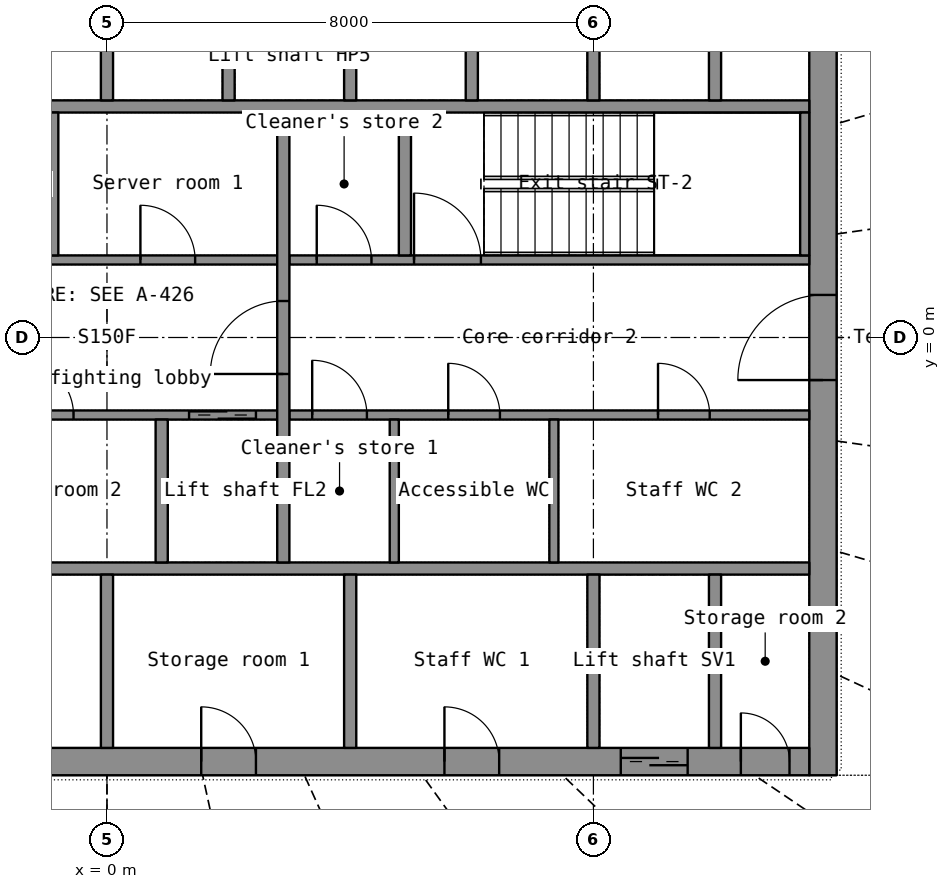
"""IFC4 building model, lengths in metres.
Left out: names, types, materials, properties, quantities, classifications, styles, units other than length and angle.
Written with IfcOpenShell. Run it as: python <this file> out.ifc"""

import sys

from ifc_helpers import new_model, si_unit, direction, frame, frame_2d, origin, place, context, subcontext, project, spatial, rectangle, extrude, element, fill, save


model = new_model("IFC4")
c1 = context("Model", 3, precision=1e-05, world=origin(), true_north=direction((0.0, 1.0)))
c2 = subcontext(c1, "Body", "Model", "MODEL_VIEW")
j1 = project(units=[si_unit("LENGTHUNIT", "METRE"), si_unit("PLANEANGLEUNIT", "RADIAN")], contexts=[c1])
p1 = place(None, origin())
s1 = spatial("IfcSite", under=j1, at=p1, CompositionType="ELEMENT")
p2 = place(p1, origin())
s2 = spatial("IfcBuilding", under=s1, at=p2, CompositionType="ELEMENT")
p3 = place(p2, frame((0.0, 0.0, 201.5)))
s3 = spatial("IfcBuildingStorey", under=s2, at=p3, CompositionType="ELEMENT", Elevation=201.5)
p4 = place(p3, frame((11.775, -7.2, 0.0), z_axis=(0.0, 0.0, 1.0), x_axis=(0.0, 1.0, 0.0)))
e1 = element("IfcWall", 1, at=p4, inside=s3, PredefinedType="SHEAR", context=c2, shape_type="SweptSolid", body=[
    extrude(rectangle(XDim=14.4, YDim=0.45, at=frame_2d((7.2, 0.0))), origin(), (0.0, 0.0, 1.0), 3.3),
])
p5 = place(p4, frame((6.5, 0.0, 0.0)))
e2 = element("IfcOpeningElement", 2, at=p5, cuts=e1, PredefinedType="OPENING", context=c2, shape_type="SweptSolid", body=[
    extrude(rectangle(XDim=1.4, YDim=2.2, at=frame_2d((0.7, 1.1))), frame((0.0, 0.235, 0.0), z_axis=(0.0, -1.0, 0.0), x_axis=(1.0, 0.0, 0.0)), (0.0, 0.0, 1.0), 0.47),
])
p6 = place(p3, frame((-11.55, -6.975, 0.0), z_axis=(0.0, 0.0, 1.0), x_axis=(1.0, 0.0, 0.0)))
e3 = element("IfcWall", 3, at=p6, inside=s3, PredefinedType="SHEAR", context=c2, shape_type="SweptSolid", body=[
    extrude(rectangle(XDim=23.1, YDim=0.45, at=frame_2d((11.55, 0.0))), origin(), (0.0, 0.0, 1.0), 3.3),
])
p7 = place(p6, frame((20.0, 0.0, 0.0)))
e4 = element("IfcOpeningElement", 4, at=p7, cuts=e3, PredefinedType="OPENING", context=c2, shape_type="SweptSolid", body=[
    extrude(rectangle(XDim=1.1, YDim=2.2, at=frame_2d((0.55, 1.1))), frame((0.0, 0.235, 0.0), z_axis=(0.0, -1.0, 0.0), x_axis=(1.0, 0.0, 0.0)), (0.0, 0.0, 1.0), 0.47),
])
p8 = place(p6, frame((6.1, 0.0, 0.0)))
e5 = element("IfcOpeningElement", 5, at=p8, cuts=e3, PredefinedType="OPENING", context=c2, shape_type="SweptSolid", body=[
    extrude(rectangle(XDim=0.9, YDim=2.1, at=frame_2d((0.45, 1.05))), frame((0.0, 0.235, 0.0), z_axis=(0.0, -1.0, 0.0), x_axis=(1.0, 0.0, 0.0)), (0.0, 0.0, 1.0), 0.47),
])
p9 = place(p6, frame((13.1, 0.0, 0.0)))
e6 = element("IfcOpeningElement", 6, at=p9, cuts=e3, PredefinedType="OPENING", context=c2, shape_type="SweptSolid", body=[
    extrude(rectangle(XDim=0.9, YDim=2.1, at=frame_2d((0.45, 1.05))), frame((0.0, 0.235, 0.0), z_axis=(0.0, -1.0, 0.0), x_axis=(1.0, 0.0, 0.0)), (0.0, 0.0, 1.0), 0.47),
])
p10 = place(p6, frame((17.1, 0.0, 0.0)))
e7 = element("IfcOpeningElement", 7, at=p10, cuts=e3, PredefinedType="OPENING", context=c2, shape_type="SweptSolid", body=[
    extrude(rectangle(XDim=0.9, YDim=2.1, at=frame_2d((0.45, 1.05))), frame((0.0, 0.235, 0.0), z_axis=(0.0, -1.0, 0.0), x_axis=(1.0, 0.0, 0.0)), (0.0, 0.0, 1.0), 0.47),
])
p11 = place(p6, frame((0.325, 0.0, 0.0)))
e8 = element("IfcOpeningElement", 8, at=p11, cuts=e3, PredefinedType="OPENING", context=c2, shape_type="SweptSolid", body=[
    extrude(rectangle(XDim=0.8, YDim=2.05, at=frame_2d((0.4, 1.025))), frame((0.0, 0.235, 0.0), z_axis=(0.0, -1.0, 0.0), x_axis=(1.0, 0.0, 0.0)), (0.0, 0.0, 1.0), 0.47),
])
p12 = place(p6, frame((21.975, 0.0, 0.0)))
e9 = element("IfcOpeningElement", 9, at=p12, cuts=e3, PredefinedType="OPENING", context=c2, shape_type="SweptSolid", body=[
    extrude(rectangle(XDim=0.8, YDim=2.05, at=frame_2d((0.4, 1.025))), frame((0.0, 0.235, 0.0), z_axis=(0.0, -1.0, 0.0), x_axis=(1.0, 0.0, 0.0)), (0.0, 0.0, 1.0), 0.47),
])
for number, where, z_axis, x_axis in (
    (10, (-11.55, -3.8, 0.0), (0.0, 0.0, 1.0), (1.0, 0.0, 0.0)),
    (11, (-11.55, 3.8, 0.0), (0.0, 0.0, 1.0), (1.0, 0.0, 0.0)),
):
    element("IfcWall", number, at=place(p3, frame(where, z_axis=z_axis, x_axis=x_axis)), inside=s3, PredefinedType="SHEAR", context=c2, shape_type="SweptSolid", body=[
        extrude(rectangle(XDim=23.1, YDim=0.2, at=frame_2d((11.55, 0.0))), origin(), (0.0, 0.0, 1.0), 3.3),
    ])
for number, where, z_axis, x_axis in (
    (12, (8.0, -6.75, 0.0), (0.0, 0.0, 1.0), (0.0, 1.0, 0.0)),
    (13, (10.0, -6.75, 0.0), (0.0, 0.0, 1.0), (0.0, 1.0, 0.0)),
):
    element("IfcWall", number, at=place(p3, frame(where, z_axis=z_axis, x_axis=x_axis)), inside=s3, PredefinedType="SHEAR", context=c2, shape_type="SweptSolid", body=[
        extrude(rectangle(XDim=2.85, YDim=0.2, at=frame_2d((1.425, 0.0))), origin(), (0.0, 0.0, 1.0), 3.3),
    ])
for number, where, z_axis, x_axis in (
    (14, (0.0, -6.75, 0.0), (0.0, 0.0, 1.0), (0.0, 1.0, 0.0)),
    (15, (4.0, -6.75, 0.0), (0.0, 0.0, 1.0), (0.0, 1.0, 0.0)),
):
    element("IfcWall", number, at=place(p3, frame(where, z_axis=z_axis, x_axis=x_axis)), inside=s3, PredefinedType="PARTITIONING", context=c2, shape_type="SweptSolid", body=[
        extrude(rectangle(XDim=2.85, YDim=0.2, at=frame_2d((1.425, 0.0))), origin(), (0.0, 0.0, 1.0), 3.3),
    ])
for number, where, z_axis, x_axis in (
    (16, (0.0, 3.9, 0.0), (0.0, 0.0, 1.0), (0.0, 1.0, 0.0)),
    (17, (2.0, 3.9, 0.0), (0.0, 0.0, 1.0), (0.0, 1.0, 0.0)),
    (18, (4.0, 3.9, 0.0), (0.0, 0.0, 1.0), (0.0, 1.0, 0.0)),
    (19, (6.0, 3.9, 0.0), (0.0, 0.0, 1.0), (0.0, 1.0, 0.0)),
    (20, (8.0, 3.9, 0.0), (0.0, 0.0, 1.0), (0.0, 1.0, 0.0)),
    (21, (10.0, 3.9, 0.0), (0.0, 0.0, 1.0), (0.0, 1.0, 0.0)),
):
    element("IfcWall", number, at=place(p3, frame(where, z_axis=z_axis, x_axis=x_axis)), inside=s3, PredefinedType="SHEAR", context=c2, shape_type="SweptSolid", body=[
        extrude(rectangle(XDim=2.85, YDim=0.2, at=frame_2d((1.425, 0.0))), origin(), (0.0, 0.0, 1.0), 3.3),
    ])
p13 = place(p3, frame((-2.8, -1.275, 0.0), z_axis=(0.0, 0.0, 1.0), x_axis=(1.0, 0.0, 0.0)))
e22 = element("IfcWall", 22, at=p13, inside=s3, PredefinedType="SHEAR", context=c2, shape_type="SweptSolid", body=[
    extrude(rectangle(XDim=5.6, YDim=0.15, at=frame_2d((2.8, 0.0))), origin(), (0.0, 0.0, 1.0), 3.3),
])
p14 = place(p13, frame((4.15, 0.0, 0.0)))
e23 = element("IfcOpeningElement", 23, at=p14, cuts=e22, PredefinedType="OPENING", context=c2, shape_type="SweptSolid", body=[
    extrude(rectangle(XDim=1.1, YDim=2.2, at=frame_2d((0.55, 1.1))), frame((0.0, 0.085, 0.0), z_axis=(0.0, -1.0, 0.0), x_axis=(1.0, 0.0, 0.0)), (0.0, 0.0, 1.0), 0.17),
])
p15 = place(p13, frame((1.35, 0.0, 0.0)))
e24 = element("IfcOpeningElement", 24, at=p15, cuts=e22, PredefinedType="OPENING", context=c2, shape_type="SweptSolid", body=[
    extrude(rectangle(XDim=0.9, YDim=2.1, at=frame_2d((0.45, 1.05))), frame((0.0, 0.085, 0.0), z_axis=(0.0, -1.0, 0.0), x_axis=(1.0, 0.0, 0.0)), (0.0, 0.0, 1.0), 0.17),
])
p16 = place(p3, frame((3.0, -1.275, 0.0), z_axis=(0.0, 0.0, 1.0), x_axis=(1.0, 0.0, 0.0)))
e25 = element("IfcWall", 25, at=p16, inside=s3, PredefinedType="PARTITIONING", context=c2, shape_type="SweptSolid", body=[
    extrude(rectangle(XDim=8.55, YDim=0.15, at=frame_2d((4.275, 0.0))), origin(), (0.0, 0.0, 1.0), 3.3),
])
p17 = place(p16, frame((0.375, 0.0, 0.0)))
e26 = element("IfcOpeningElement", 26, at=p17, cuts=e25, PredefinedType="OPENING", context=c2, shape_type="SweptSolid", body=[
    extrude(rectangle(XDim=0.9, YDim=2.1, at=frame_2d((0.45, 1.05))), frame((0.0, 0.085, 0.0), z_axis=(0.0, -1.0, 0.0), x_axis=(1.0, 0.0, 0.0)), (0.0, 0.0, 1.0), 0.17),
])
p18 = place(p16, frame((2.613, 0.0, 0.0)))
e27 = element("IfcOpeningElement", 27, at=p18, cuts=e25, PredefinedType="OPENING", context=c2, shape_type="SweptSolid", body=[
    extrude(rectangle(XDim=0.85, YDim=2.1, at=frame_2d((0.425, 1.05))), frame((0.0, 0.085, 0.0), z_axis=(0.0, -1.0, 0.0), x_axis=(1.0, 0.0, 0.0)), (0.0, 0.0, 1.0), 0.17),
])
p19 = place(p16, frame((6.062, 0.0, 0.0)))
e28 = element("IfcOpeningElement", 28, at=p19, cuts=e25, PredefinedType="OPENING", context=c2, shape_type="SweptSolid", body=[
    extrude(rectangle(XDim=0.85, YDim=2.1, at=frame_2d((0.425, 1.05))), frame((0.0, 0.085, 0.0), z_axis=(0.0, -1.0, 0.0), x_axis=(1.0, 0.0, 0.0)), (0.0, 0.0, 1.0), 0.17),
])
p20 = place(p3, frame((-2.8, 1.275, 0.0), z_axis=(0.0, 0.0, 1.0), x_axis=(1.0, 0.0, 0.0)))
e29 = element("IfcWall", 29, at=p20, inside=s3, PredefinedType="SHEAR", context=c2, shape_type="SweptSolid", body=[
    extrude(rectangle(XDim=5.6, YDim=0.15, at=frame_2d((2.8, 0.0))), origin(), (0.0, 0.0, 1.0), 3.3),
])
p21 = place(p20, frame((0.35, 0.0, 0.0)))
e30 = element("IfcOpeningElement", 30, at=p21, cuts=e29, PredefinedType="OPENING", context=c2, shape_type="SweptSolid", body=[
    extrude(rectangle(XDim=1.1, YDim=2.2, at=frame_2d((0.55, 1.1))), frame((0.0, 0.085, 0.0), z_axis=(0.0, -1.0, 0.0), x_axis=(1.0, 0.0, 0.0)), (0.0, 0.0, 1.0), 0.17),
])
p22 = place(p20, frame((3.35, 0.0, 0.0)))
e31 = element("IfcOpeningElement", 31, at=p22, cuts=e29, PredefinedType="OPENING", context=c2, shape_type="SweptSolid", body=[
    extrude(rectangle(XDim=0.9, YDim=2.1, at=frame_2d((0.45, 1.05))), frame((0.0, 0.085, 0.0), z_axis=(0.0, -1.0, 0.0), x_axis=(1.0, 0.0, 0.0)), (0.0, 0.0, 1.0), 0.17),
])
p23 = place(p3, frame((3.0, 1.275, 0.0), z_axis=(0.0, 0.0, 1.0), x_axis=(1.0, 0.0, 0.0)))
e32 = element("IfcWall", 32, at=p23, inside=s3, PredefinedType="SHEAR", context=c2, shape_type="SweptSolid", body=[
    extrude(rectangle(XDim=8.55, YDim=0.15, at=frame_2d((4.275, 0.0))), origin(), (0.0, 0.0, 1.0), 3.3),
])
p24 = place(p23, frame((2.05, 0.0, 0.0)))
e33 = element("IfcOpeningElement", 33, at=p24, cuts=e32, PredefinedType="OPENING", context=c2, shape_type="SweptSolid", body=[
    extrude(rectangle(XDim=1.1, YDim=2.15, at=frame_2d((0.55, 1.075))), frame((0.0, 0.085, 0.0), z_axis=(0.0, -1.0, 0.0), x_axis=(1.0, 0.0, 0.0)), (0.0, 0.0, 1.0), 0.17),
])
p25 = place(p23, frame((0.45, 0.0, 0.0)))
e34 = element("IfcOpeningElement", 34, at=p25, cuts=e32, PredefinedType="OPENING", context=c2, shape_type="SweptSolid", body=[
    extrude(rectangle(XDim=0.9, YDim=2.1, at=frame_2d((0.45, 1.05))), frame((0.0, 0.085, 0.0), z_axis=(0.0, -1.0, 0.0), x_axis=(1.0, 0.0, 0.0)), (0.0, 0.0, 1.0), 0.17),
])
p26 = place(p3, frame((2.9, -3.7, 0.0), z_axis=(0.0, 0.0, 1.0), x_axis=(0.0, 1.0, 0.0)))
e35 = element("IfcWall", 35, at=p26, inside=s3, PredefinedType="SHEAR", context=c2, shape_type="SweptSolid", body=[
    extrude(rectangle(XDim=7.4, YDim=0.2, at=frame_2d((3.7, 0.0))), origin(), (0.0, 0.0, 1.0), 3.3),
])
p27 = place(p26, frame((3.1, 0.0, 0.0)))
e36 = element("IfcOpeningElement", 36, at=p27, cuts=e35, PredefinedType="OPENING", context=c2, shape_type="SweptSolid", body=[
    extrude(rectangle(XDim=1.2, YDim=2.2, at=frame_2d((0.6, 1.1))), frame((0.0, 0.11, 0.0), z_axis=(0.0, -1.0, 0.0), x_axis=(1.0, 0.0, 0.0)), (0.0, 0.0, 1.0), 0.22),
])
for number, where, z_axis, x_axis in (
    (37, (-0.9, 1.35, 0.0), (0.0, 0.0, 1.0), (0.0, 1.0, 0.0)),
    (38, (0.9, -3.7, 0.0), (0.0, 0.0, 1.0), (0.0, 1.0, 0.0)),
):
    element("IfcWall", number, at=place(p3, frame(where, z_axis=z_axis, x_axis=x_axis)), inside=s3, PredefinedType="SHEAR", context=c2, shape_type="SweptSolid", body=[
        extrude(rectangle(XDim=2.35, YDim=0.2, at=frame_2d((1.175, 0.0))), origin(), (0.0, 0.0, 1.0), 3.3),
    ])
p28 = place(p3, frame((11.475, 1.35, 0.0), z_axis=(0.0, 0.0, 1.0), x_axis=(0.0, 1.0, 0.0)))
e39 = element("IfcWall", 39, at=p28, inside=s3, PredefinedType="SHEAR", context=c2, shape_type="SweptSolid", body=[
    extrude(rectangle(XDim=2.35, YDim=0.15, at=frame_2d((1.175, 0.0))), origin(), (0.0, 0.0, 1.0), 3.3),
])
p29 = place(p3, frame((4.9, 1.35, 0.0), z_axis=(0.0, 0.0, 1.0), x_axis=(0.0, 1.0, 0.0)))
e40 = element("IfcWall", 40, at=p29, inside=s3, PredefinedType="SHEAR", context=c2, shape_type="SweptSolid", body=[
    extrude(rectangle(XDim=2.35, YDim=0.2, at=frame_2d((1.175, 0.0))), origin(), (0.0, 0.0, 1.0), 3.3),
])
for number, where, z_axis, x_axis in (
    (41, (4.725, -3.7, 0.0), (0.0, 0.0, 1.0), (0.0, 1.0, 0.0)),
    (42, (7.35, -3.7, 0.0), (0.0, 0.0, 1.0), (0.0, 1.0, 0.0)),
):
    element("IfcWall", number, at=place(p3, frame(where, z_axis=z_axis, x_axis=x_axis)), inside=s3, PredefinedType="PARTITIONING", context=c2, shape_type="SweptSolid", body=[
        extrude(rectangle(XDim=2.35, YDim=0.15, at=frame_2d((1.175, 0.0))), origin(), (0.0, 0.0, 1.0), 3.3),
    ])
p30 = place(p7, origin())
e43 = element("IfcDoor", 43, at=p30, inside=s3, OperationType="DOUBLE_DOOR_SLIDING", PredefinedType="DOOR", context=c2, shape_type="SweptSolid", body=[
    extrude(rectangle(XDim=1.1, YDim=2.2, at=frame_2d((0.55, 1.1))), frame((0.0, 0.025, 0.0), z_axis=(0.0, -1.0, 0.0), x_axis=(1.0, 0.0, 0.0)), (0.0, 0.0, 1.0), 0.05),
])
fill(e4, e43)
p31 = place(p9, origin())
e44 = element("IfcDoor", 44, at=p31, inside=s3, OperationType="SINGLE_SWING_LEFT", PredefinedType="DOOR", context=c2, shape_type="SweptSolid", body=[
    extrude(rectangle(XDim=0.9, YDim=2.1, at=frame_2d((0.45, 1.05))), frame((0.0, 0.025, 0.0), z_axis=(0.0, -1.0, 0.0), x_axis=(1.0, 0.0, 0.0)), (0.0, 0.0, 1.0), 0.05),
])
fill(e6, e44)
p32 = place(p10, origin())
e45 = element("IfcDoor", 45, at=p32, inside=s3, OperationType="SINGLE_SWING_LEFT", PredefinedType="DOOR", context=c2, shape_type="SweptSolid", body=[
    extrude(rectangle(XDim=0.9, YDim=2.1, at=frame_2d((0.45, 1.05))), frame((0.0, 0.025, 0.0), z_axis=(0.0, -1.0, 0.0), x_axis=(1.0, 0.0, 0.0)), (0.0, 0.0, 1.0), 0.05),
])
fill(e7, e45)
p33 = place(p12, origin())
e46 = element("IfcDoor", 46, at=p33, inside=s3, OperationType="SINGLE_SWING_LEFT", PredefinedType="DOOR", context=c2, shape_type="SweptSolid", body=[
    extrude(rectangle(XDim=0.8, YDim=2.05, at=frame_2d((0.4, 1.025))), frame((0.0, 0.025, 0.0), z_axis=(0.0, -1.0, 0.0), x_axis=(1.0, 0.0, 0.0)), (0.0, 0.0, 1.0), 0.05),
])
fill(e9, e46)
p34 = place(p5, origin())
e47 = element("IfcDoor", 47, at=p34, inside=s3, OperationType="DOUBLE_DOOR_SINGLE_SWING", PredefinedType="DOOR", context=c2, shape_type="SweptSolid", body=[
    extrude(rectangle(XDim=1.4, YDim=2.2, at=frame_2d((0.7, 1.1))), frame((0.0, 0.025, 0.0), z_axis=(0.0, -1.0, 0.0), x_axis=(1.0, 0.0, 0.0)), (0.0, 0.0, 1.0), 0.05),
])
fill(e2, e47)
p35 = place(p27, origin())
e48 = element("IfcDoor", 48, at=p35, inside=s3, OperationType="SINGLE_SWING_LEFT", PredefinedType="DOOR", context=c2, shape_type="SweptSolid", body=[
    extrude(rectangle(XDim=1.2, YDim=2.2, at=frame_2d((0.6, 1.1))), frame((0.0, 0.025, 0.0), z_axis=(0.0, -1.0, 0.0), x_axis=(1.0, 0.0, 0.0)), (0.0, 0.0, 1.0), 0.05),
])
fill(e36, e48)
p36 = place(p14, origin())
e49 = element("IfcDoor", 49, at=p36, inside=s3, OperationType="DOUBLE_DOOR_SLIDING", PredefinedType="DOOR", context=c2, shape_type="SweptSolid", body=[
    extrude(rectangle(XDim=1.1, YDim=2.2, at=frame_2d((0.55, 1.1))), frame((0.0, 0.025, 0.0), z_axis=(0.0, -1.0, 0.0), x_axis=(1.0, 0.0, 0.0)), (0.0, 0.0, 1.0), 0.05),
])
fill(e23, e49)
p37 = place(p24, origin())
e50 = element("IfcDoor", 50, at=p37, inside=s3, OperationType="SINGLE_SWING_LEFT", PredefinedType="DOOR", context=c2, shape_type="SweptSolid", body=[
    extrude(rectangle(XDim=1.1, YDim=2.15, at=frame_2d((0.55, 1.075))), frame((0.0, 0.025, 0.0), z_axis=(0.0, -1.0, 0.0), x_axis=(1.0, 0.0, 0.0)), (0.0, 0.0, 1.0), 0.05),
])
fill(e33, e50)
p38 = place(p17, origin())
e51 = element("IfcDoor", 51, at=p38, inside=s3, OperationType="SINGLE_SWING_LEFT", PredefinedType="DOOR", context=c2, shape_type="SweptSolid", body=[
    extrude(rectangle(XDim=0.9, YDim=2.1, at=frame_2d((0.45, 1.05))), frame((0.0, 0.025, 0.0), z_axis=(0.0, -1.0, 0.0), x_axis=(1.0, 0.0, 0.0)), (0.0, 0.0, 1.0), 0.05),
])
fill(e26, e51)
p39 = place(p18, origin())
e52 = element("IfcDoor", 52, at=p39, inside=s3, OperationType="SINGLE_SWING_LEFT", PredefinedType="DOOR", context=c2, shape_type="SweptSolid", body=[
    extrude(rectangle(XDim=0.85, YDim=2.1, at=frame_2d((0.425, 1.05))), frame((0.0, 0.025, 0.0), z_axis=(0.0, -1.0, 0.0), x_axis=(1.0, 0.0, 0.0)), (0.0, 0.0, 1.0), 0.05),
])
fill(e27, e52)
p40 = place(p19, origin())
e53 = element("IfcDoor", 53, at=p40, inside=s3, OperationType="SINGLE_SWING_LEFT", PredefinedType="DOOR", context=c2, shape_type="SweptSolid", body=[
    extrude(rectangle(XDim=0.85, YDim=2.1, at=frame_2d((0.425, 1.05))), frame((0.0, 0.025, 0.0), z_axis=(0.0, -1.0, 0.0), x_axis=(1.0, 0.0, 0.0)), (0.0, 0.0, 1.0), 0.05),
])
fill(e28, e53)
p41 = place(p22, origin())
e54 = element("IfcDoor", 54, at=p41, inside=s3, OperationType="SINGLE_SWING_LEFT", PredefinedType="DOOR", context=c2, shape_type="SweptSolid", body=[
    extrude(rectangle(XDim=0.9, YDim=2.1, at=frame_2d((0.45, 1.05))), frame((0.0, 0.025, 0.0), z_axis=(0.0, -1.0, 0.0), x_axis=(1.0, 0.0, 0.0)), (0.0, 0.0, 1.0), 0.05),
])
fill(e31, e54)
p42 = place(p15, origin())
e55 = element("IfcDoor", 55, at=p42, inside=s3, OperationType="SINGLE_SWING_LEFT", PredefinedType="DOOR", context=c2, shape_type="SweptSolid", body=[
    extrude(rectangle(XDim=0.9, YDim=2.1, at=frame_2d((0.45, 1.05))), frame((0.0, 0.025, 0.0), z_axis=(0.0, -1.0, 0.0), x_axis=(1.0, 0.0, 0.0)), (0.0, 0.0, 1.0), 0.05),
])
fill(e24, e55)
p43 = place(p25, origin())
e56 = element("IfcDoor", 56, at=p43, inside=s3, OperationType="SINGLE_SWING_LEFT", PredefinedType="DOOR", context=c2, shape_type="SweptSolid", body=[
    extrude(rectangle(XDim=0.9, YDim=2.1, at=frame_2d((0.45, 1.05))), frame((0.0, 0.025, 0.0), z_axis=(0.0, -1.0, 0.0), x_axis=(1.0, 0.0, 0.0)), (0.0, 0.0, 1.0), 0.05),
])
fill(e34, e56)
save(model, sys.argv[1])
